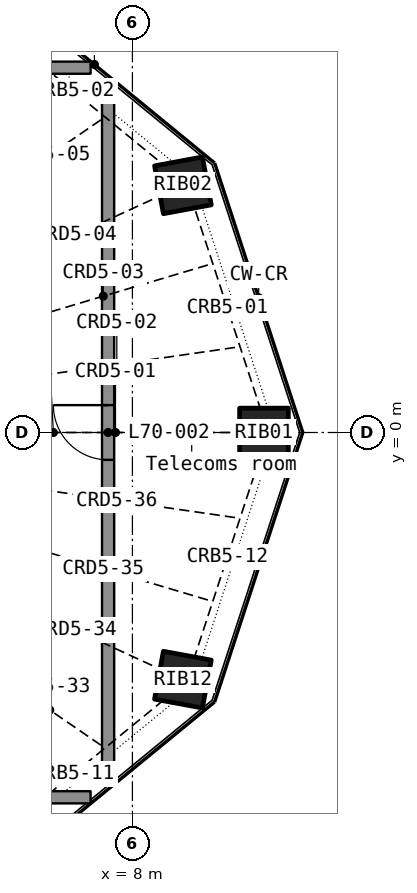
"""IFC4 building model, lengths in metres.
Left out: names, types, materials, properties, quantities, classifications, styles, units other than length and angle.
Written with IfcOpenShell. Run it as: python <this file> out.ifc"""

import sys

from ifc_helpers import new_model, si_unit, direction, frame, frame_2d, origin, origin_2d, place, context, subcontext, project, spatial, rectangle, hollow_rectangle, extrude, element, fill, save


model = new_model("IFC4")
c1 = context("Model", 3, precision=1e-05, world=origin(), true_north=direction((0.0, 1.0)))
c2 = subcontext(c1, "Body", "Model", "MODEL_VIEW")
j1 = project(units=[si_unit("LENGTHUNIT", "METRE"), si_unit("PLANEANGLEUNIT", "RADIAN")], contexts=[c1])
p1 = place(None, origin())
s1 = spatial("IfcSite", under=j1, at=p1, CompositionType="ELEMENT")
p2 = place(p1, origin())
s2 = spatial("IfcBuilding", under=s1, at=p2, CompositionType="ELEMENT")
p3 = place(p2, frame((0.0, 0.0, 288.2)))
s3 = spatial("IfcBuildingStorey", under=s2, at=p3, CompositionType="ELEMENT", Elevation=288.2)
p4 = place(p3, frame((10.164, 0.0, 0.0), z_axis=(-0.136914367, 0.0, 0.990582887), x_axis=(0.0, -1.0, 0.0)))
e1 = element("IfcColumn", 1, at=p4, inside=s3, PredefinedType="COLUMN", context=c2, shape_type="SweptSolid", body=[
    extrude(hollow_rectangle(XDim=0.8, YDim=0.8, WallThickness=0.025, at=origin_2d()), origin(), (0.0, 0.0, 1.0), 3.937),
])
for number, where, z_axis, x_axis in (
    (2, (8.831, 4.065, 0.0), (-0.119, -0.055, 0.991), (0.575, -0.818, 0.024)),
    (3, (8.831, -4.065, 0.0), (-0.119, 0.055, 0.991), (-0.575, -0.818, -0.024)),
):
    element("IfcColumn", number, at=place(p3, frame(where, z_axis=z_axis, x_axis=x_axis)), inside=s3, PredefinedType="COLUMN", context=c2, shape_type="SweptSolid", body=[
        extrude(hollow_rectangle(XDim=0.8, YDim=0.8, WallThickness=0.025, at=origin_2d()), origin(), (0.0, 0.0, 1.0), 3.934),
    ])
p5 = place(p3, frame((7.6, -5.755, 0.0), z_axis=(0.0, 0.0, 1.0), x_axis=(0.0, 1.0, 0.0)))
e4 = element("IfcWall", 4, at=p5, inside=s3, PredefinedType="PARTITIONING", context=c2, shape_type="SweptSolid", body=[
    extrude(rectangle(XDim=11.511, YDim=0.2, at=frame_2d((5.755, 0.0))), origin(), (0.0, 0.0, 1.0), 2.9),
])
p6 = place(p5, frame((5.305, 0.0, 0.0)))
e5 = element("IfcOpeningElement", 5, at=p6, cuts=e4, PredefinedType="OPENING", context=c2, shape_type="SweptSolid", body=[
    extrude(rectangle(XDim=0.9, YDim=2.1, at=frame_2d((0.45, 1.05))), frame((0.0, 0.11, 0.0), z_axis=(0.0, -1.0, 0.0), x_axis=(1.0, 0.0, 0.0)), (0.0, 0.0, 1.0), 0.22),
])
for number, where, z_axis, x_axis in (
    (6, (5.813, -6.0, 0.0), (0.0, 0.0, 1.0), (1.0, 0.0, 0.0)),
    (7, (7.312, 6.0, 0.0), (0.0, 0.0, 1.0), (-1.0, 0.0, 0.0)),
):
    element("IfcWall", number, at=place(p3, frame(where, z_axis=z_axis, x_axis=x_axis)), inside=s3, PredefinedType="PARTITIONING", context=c2, shape_type="SweptSolid", body=[
        extrude(rectangle(XDim=1.5, YDim=0.2, at=frame_2d((0.75, 0.0))), origin(), (0.0, 0.0, 1.0), 2.9),
    ])
p7 = place(p6, origin())
e8 = element("IfcDoor", 8, at=p7, inside=s3, OperationType="SINGLE_SWING_RIGHT", PredefinedType="DOOR", context=c2, shape_type="SweptSolid", body=[
    extrude(rectangle(XDim=0.9, YDim=2.1, at=frame_2d((0.45, 1.05))), frame((0.0, 0.025, 0.0), z_axis=(0.0, -1.0, 0.0), x_axis=(1.0, 0.0, 0.0)), (0.0, 0.0, 1.0), 0.05),
])
fill(e5, e8)
save(model, sys.argv[1])
